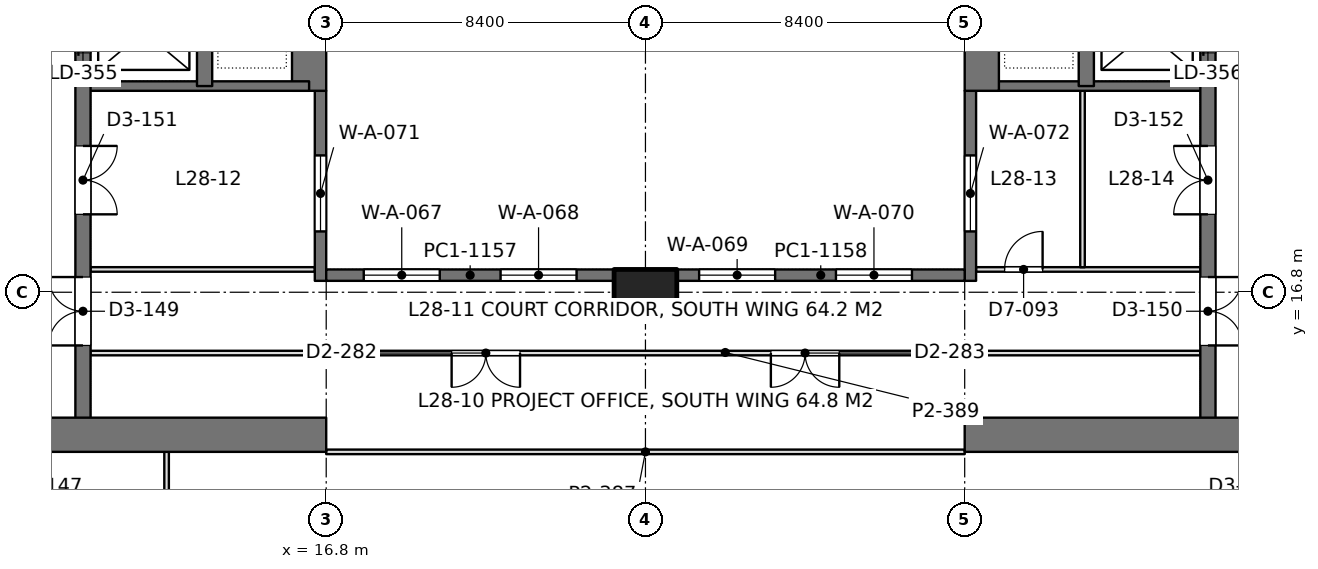
"""IFC4 building model, lengths in metres.
Left out: names, types, materials, properties, quantities, classifications, styles, units other than length and angle.
Written with IfcOpenShell. Run it as: python <this file> out.ifc"""

import sys

from ifc_helpers import new_model, si_unit, direction, frame, frame_2d, origin, origin_2d, place, context, subcontext, project, spatial, rectangle, extrude, element, fill, save


model = new_model("IFC4")
c1 = context("Model", 3, precision=1e-05, world=origin(), true_north=direction((0.0, 1.0)))
c2 = subcontext(c1, "Body", "Model", "MODEL_VIEW")
j1 = project(units=[si_unit("LENGTHUNIT", "METRE"), si_unit("PLANEANGLEUNIT", "RADIAN")], contexts=[c1])
p1 = place(None, origin())
s1 = spatial("IfcSite", under=j1, at=p1, CompositionType="ELEMENT")
p2 = place(p1, origin())
s2 = spatial("IfcBuilding", under=s1, at=p2, CompositionType="ELEMENT")
p3 = place(p2, frame((0.0, 0.0, 126.0)))
s3 = spatial("IfcBuildingStorey", under=s2, at=p3, CompositionType="ELEMENT", Elevation=126.0)
p4 = place(p3, frame((25.2, 16.8, 0.0), z_axis=(0.0, 0.0, 1.0), x_axis=(1.0, 0.0, 0.0)))
e1 = element("IfcColumn", 1, at=p4, inside=s3, PredefinedType="COLUMN", context=c2, shape_type="SweptSolid", body=[
    extrude(rectangle(XDim=1.65, YDim=1.2, at=origin_2d()), origin(), (0.0, 0.0, 1.0), 4.2),
])
p5 = place(p3, frame((-1.2, 13.05, 0.0), z_axis=(0.0, 0.0, 1.0), x_axis=(1.0, 0.0, 0.0)))
e2 = element("IfcWall", 2, at=p5, inside=s3, PredefinedType="SHEAR", context=c2, shape_type="SweptSolid", body=[
    extrude(rectangle(XDim=18.0, YDim=0.9, at=frame_2d((9.0, 0.0))), origin(), (0.0, 0.0, 1.0), 4.2),
])
p6 = place(p5, frame((8.95, 0.0, 0.0)))
e3 = element("IfcOpeningElement", 3, at=p6, cuts=e2, PredefinedType="OPENING", context=c2, shape_type="SweptSolid", body=[
    extrude(rectangle(XDim=1.8, YDim=2.4, at=frame_2d((0.9, 1.2))), frame((0.0, 0.46, 0.0), z_axis=(0.0, -1.0, 0.0), x_axis=(1.0, 0.0, 0.0)), (0.0, 0.0, 1.0), 0.92),
])
p7 = place(p3, frame((16.35, 22.1, 0.0), z_axis=(0.0, 0.0, 1.0), x_axis=(0.0, 1.0, 0.0)))
e4 = element("IfcWall", 4, at=p7, inside=s3, PredefinedType="SHEAR", context=c2, shape_type="SweptSolid", body=[
    extrude(rectangle(XDim=15.25, YDim=0.9, at=frame_2d((7.625, 0.0))), origin(), (0.0, 0.0, 1.0), 4.2),
])
p8 = place(p3, frame((10.4, 13.05, 0.0), z_axis=(0.0, 0.0, 1.0), x_axis=(0.0, 1.0, 0.0)))
e5 = element("IfcWall", 5, at=p8, inside=s3, PredefinedType="SHEAR", context=c2, shape_type="SweptSolid", body=[
    extrude(rectangle(XDim=24.3, YDim=0.4, at=frame_2d((12.15, 0.0))), origin(), (0.0, 0.0, 1.0), 4.2),
])
p9 = place(p8, frame((10.05, 0.0, 0.0)))
e6 = element("IfcOpeningElement", 6, at=p9, cuts=e5, PredefinedType="OPENING", context=c2, shape_type="SweptSolid", body=[
    extrude(rectangle(XDim=1.1, YDim=2.2, at=frame_2d((0.55, 1.1))), frame((0.0, 0.21, 0.0), z_axis=(0.0, -1.0, 0.0), x_axis=(1.0, 0.0, 0.0)), (0.0, 0.0, 1.0), 0.42),
])
p10 = place(p8, frame((12.9, 0.0, 0.0)))
e7 = element("IfcOpeningElement", 7, at=p10, cuts=e5, PredefinedType="OPENING", context=c2, shape_type="SweptSolid", body=[
    extrude(rectangle(XDim=1.1, YDim=2.2, at=frame_2d((0.55, 1.1))), frame((0.0, 0.21, 0.0), z_axis=(0.0, -1.0, 0.0), x_axis=(1.0, 0.0, 0.0)), (0.0, 0.0, 1.0), 0.42),
])
p11 = place(p8, frame((21.45, 0.0, 0.0)))
e8 = element("IfcOpeningElement", 8, at=p11, cuts=e5, PredefinedType="OPENING", context=c2, shape_type="SweptSolid", body=[
    extrude(rectangle(XDim=1.1, YDim=2.2, at=frame_2d((0.55, 1.1))), frame((0.0, 0.21, 0.0), z_axis=(0.0, -1.0, 0.0), x_axis=(1.0, 0.0, 0.0)), (0.0, 0.0, 1.0), 0.42),
])
p12 = place(p8, frame((2.35, 0.0, 0.0)))
e9 = element("IfcOpeningElement", 9, at=p12, cuts=e5, PredefinedType="OPENING", context=c2, shape_type="SweptSolid", body=[
    extrude(rectangle(XDim=1.8, YDim=2.4, at=frame_2d((0.9, 1.2))), frame((0.0, 0.21, 0.0), z_axis=(0.0, -1.0, 0.0), x_axis=(1.0, 0.0, 0.0)), (0.0, 0.0, 1.0), 0.42),
])
p13 = place(p8, frame((5.8, 0.0, 0.0)))
e10 = element("IfcOpeningElement", 10, at=p13, cuts=e5, PredefinedType="OPENING", context=c2, shape_type="SweptSolid", body=[
    extrude(rectangle(XDim=1.8, YDim=2.4, at=frame_2d((0.9, 1.2))), frame((0.0, 0.21, 0.0), z_axis=(0.0, -1.0, 0.0), x_axis=(1.0, 0.0, 0.0)), (0.0, 0.0, 1.0), 0.42),
])
p14 = place(p3, frame((13.6, 22.225, 0.0), z_axis=(0.0, 0.0, 1.0), x_axis=(0.0, 1.0, 0.0)))
e11 = element("IfcWall", 11, at=p14, inside=s3, PredefinedType="SHEAR", context=c2, shape_type="SweptSolid", body=[
    extrude(rectangle(XDim=15.125, YDim=0.4, at=frame_2d((7.562, 0.0))), origin(), (0.0, 0.0, 1.0), 4.2),
])
p15 = place(p3, frame((10.4, 22.225, 0.0), z_axis=(0.0, 0.0, 1.0), x_axis=(1.0, 0.0, 0.0)))
e12 = element("IfcWall", 12, at=p15, inside=s3, PredefinedType="SHEAR", context=c2, shape_type="SweptSolid", body=[
    extrude(rectangle(XDim=5.95, YDim=0.25, at=frame_2d((2.975, 0.0))), origin(), (0.0, 0.0, 1.0), 4.2),
])
p16 = place(p3, frame((33.6, 13.05, 0.0), z_axis=(0.0, 0.0, 1.0), x_axis=(1.0, 0.0, 0.0)))
e13 = element("IfcWall", 13, at=p16, inside=s3, PredefinedType="SHEAR", context=c2, shape_type="SweptSolid", body=[
    extrude(rectangle(XDim=18.0, YDim=0.9, at=frame_2d((9.0, 0.0))), origin(), (0.0, 0.0, 1.0), 4.2),
])
p17 = place(p16, frame((7.25, 0.0, 0.0)))
e14 = element("IfcOpeningElement", 14, at=p17, cuts=e13, PredefinedType="OPENING", context=c2, shape_type="SweptSolid", body=[
    extrude(rectangle(XDim=1.8, YDim=2.4, at=frame_2d((0.9, 1.2))), frame((0.0, 0.46, 0.0), z_axis=(0.0, -1.0, 0.0), x_axis=(1.0, 0.0, 0.0)), (0.0, 0.0, 1.0), 0.92),
])
p18 = place(p3, frame((34.05, 22.1, 0.0), z_axis=(0.0, 0.0, 1.0), x_axis=(0.0, 1.0, 0.0)))
e15 = element("IfcWall", 15, at=p18, inside=s3, PredefinedType="SHEAR", context=c2, shape_type="SweptSolid", body=[
    extrude(rectangle(XDim=15.25, YDim=0.9, at=frame_2d((7.625, 0.0))), origin(), (0.0, 0.0, 1.0), 4.2),
])
p19 = place(p3, frame((40.0, 13.05, 0.0), z_axis=(0.0, 0.0, 1.0), x_axis=(0.0, 1.0, 0.0)))
e16 = element("IfcWall", 16, at=p19, inside=s3, PredefinedType="SHEAR", context=c2, shape_type="SweptSolid", body=[
    extrude(rectangle(XDim=24.3, YDim=0.4, at=frame_2d((12.15, 0.0))), origin(), (0.0, 0.0, 1.0), 4.2),
])
p20 = place(p19, frame((10.05, 0.0, 0.0)))
e17 = element("IfcOpeningElement", 17, at=p20, cuts=e16, PredefinedType="OPENING", context=c2, shape_type="SweptSolid", body=[
    extrude(rectangle(XDim=1.1, YDim=2.2, at=frame_2d((0.55, 1.1))), frame((0.0, 0.21, 0.0), z_axis=(0.0, -1.0, 0.0), x_axis=(1.0, 0.0, 0.0)), (0.0, 0.0, 1.0), 0.42),
])
p21 = place(p19, frame((12.9, 0.0, 0.0)))
e18 = element("IfcOpeningElement", 18, at=p21, cuts=e16, PredefinedType="OPENING", context=c2, shape_type="SweptSolid", body=[
    extrude(rectangle(XDim=1.1, YDim=2.2, at=frame_2d((0.55, 1.1))), frame((0.0, 0.21, 0.0), z_axis=(0.0, -1.0, 0.0), x_axis=(1.0, 0.0, 0.0)), (0.0, 0.0, 1.0), 0.42),
])
p22 = place(p19, frame((21.45, 0.0, 0.0)))
e19 = element("IfcOpeningElement", 19, at=p22, cuts=e16, PredefinedType="OPENING", context=c2, shape_type="SweptSolid", body=[
    extrude(rectangle(XDim=1.1, YDim=2.2, at=frame_2d((0.55, 1.1))), frame((0.0, 0.21, 0.0), z_axis=(0.0, -1.0, 0.0), x_axis=(1.0, 0.0, 0.0)), (0.0, 0.0, 1.0), 0.42),
])
p23 = place(p19, frame((2.35, 0.0, 0.0)))
e20 = element("IfcOpeningElement", 20, at=p23, cuts=e16, PredefinedType="OPENING", context=c2, shape_type="SweptSolid", body=[
    extrude(rectangle(XDim=1.8, YDim=2.4, at=frame_2d((0.9, 1.2))), frame((0.0, 0.21, 0.0), z_axis=(0.0, -1.0, 0.0), x_axis=(1.0, 0.0, 0.0)), (0.0, 0.0, 1.0), 0.42),
])
p24 = place(p19, frame((5.8, 0.0, 0.0)))
e21 = element("IfcOpeningElement", 21, at=p24, cuts=e16, PredefinedType="OPENING", context=c2, shape_type="SweptSolid", body=[
    extrude(rectangle(XDim=1.8, YDim=2.4, at=frame_2d((0.9, 1.2))), frame((0.0, 0.21, 0.0), z_axis=(0.0, -1.0, 0.0), x_axis=(1.0, 0.0, 0.0)), (0.0, 0.0, 1.0), 0.42),
])
p25 = place(p3, frame((36.8, 22.225, 0.0), z_axis=(0.0, 0.0, 1.0), x_axis=(0.0, 1.0, 0.0)))
e22 = element("IfcWall", 22, at=p25, inside=s3, PredefinedType="SHEAR", context=c2, shape_type="SweptSolid", body=[
    extrude(rectangle(XDim=15.125, YDim=0.4, at=frame_2d((7.562, 0.0))), origin(), (0.0, 0.0, 1.0), 4.2),
])
p26 = place(p3, frame((40.0, 22.225, 0.0), z_axis=(0.0, 0.0, 1.0), x_axis=(-1.0, 0.0, 0.0)))
e23 = element("IfcWall", 23, at=p26, inside=s3, PredefinedType="SHEAR", context=c2, shape_type="SweptSolid", body=[
    extrude(rectangle(XDim=5.95, YDim=0.25, at=frame_2d((2.975, 0.0))), origin(), (0.0, 0.0, 1.0), 4.2),
])
p27 = place(p3, frame((16.65, 17.1, 0.0), z_axis=(0.0, 0.0, 1.0), x_axis=(0.0, 1.0, 0.0)))
e24 = element("IfcWall", 24, at=p27, inside=s3, PredefinedType="SOLIDWALL", context=c2, shape_type="SweptSolid", body=[
    extrude(rectangle(XDim=5.0, YDim=0.3, at=frame_2d((2.5, 0.0))), origin(), (0.0, 0.0, 1.0), 4.05),
])
p28 = place(p27, frame((1.3, 0.0, 0.1)))
e25 = element("IfcOpeningElement", 25, at=p28, cuts=e24, PredefinedType="OPENING", context=c2, shape_type="SweptSolid", body=[
    extrude(rectangle(XDim=2.0, YDim=3.0, at=frame_2d((1.0, 1.5))), frame((0.0, 0.16, 0.0), z_axis=(0.0, -1.0, 0.0), x_axis=(1.0, 0.0, 0.0)), (0.0, 0.0, 1.0), 0.32),
])
p29 = place(p3, frame((33.75, 17.1, 0.0), z_axis=(0.0, 0.0, 1.0), x_axis=(0.0, 1.0, 0.0)))
e26 = element("IfcWall", 26, at=p29, inside=s3, PredefinedType="SOLIDWALL", context=c2, shape_type="SweptSolid", body=[
    extrude(rectangle(XDim=5.0, YDim=0.3, at=frame_2d((2.5, 0.0))), origin(), (0.0, 0.0, 1.0), 4.05),
])
p30 = place(p29, frame((1.3, 0.0, 0.1)))
e27 = element("IfcOpeningElement", 27, at=p30, cuts=e26, PredefinedType="OPENING", context=c2, shape_type="SweptSolid", body=[
    extrude(rectangle(XDim=2.0, YDim=3.0, at=frame_2d((1.0, 1.5))), frame((0.0, 0.16, 0.0), z_axis=(0.0, -1.0, 0.0), x_axis=(1.0, 0.0, 0.0)), (0.0, 0.0, 1.0), 0.32),
])
p31 = place(p3, frame((16.8, 17.25, 0.0), z_axis=(0.0, 0.0, 1.0), x_axis=(1.0, 0.0, 0.0)))
e28 = element("IfcWall", 28, at=p31, inside=s3, PredefinedType="SOLIDWALL", context=c2, shape_type="SweptSolid", body=[
    extrude(rectangle(XDim=7.575, YDim=0.3, at=frame_2d((3.788, 0.0))), origin(), (0.0, 0.0, 1.0), 4.05),
])
p32 = place(p31, frame((0.988, 0.0, 0.1)))
e29 = element("IfcOpeningElement", 29, at=p32, cuts=e28, PredefinedType="OPENING", context=c2, shape_type="SweptSolid", body=[
    extrude(rectangle(XDim=2.0, YDim=3.0, at=frame_2d((1.0, 1.5))), frame((0.0, 0.16, 0.0), z_axis=(0.0, -1.0, 0.0), x_axis=(1.0, 0.0, 0.0)), (0.0, 0.0, 1.0), 0.32),
])
p33 = place(p31, frame((4.587, 0.0, 0.1)))
e30 = element("IfcOpeningElement", 30, at=p33, cuts=e28, PredefinedType="OPENING", context=c2, shape_type="SweptSolid", body=[
    extrude(rectangle(XDim=2.0, YDim=3.0, at=frame_2d((1.0, 1.5))), frame((0.0, 0.16, 0.0), z_axis=(0.0, -1.0, 0.0), x_axis=(1.0, 0.0, 0.0)), (0.0, 0.0, 1.0), 0.32),
])
p34 = place(p3, frame((26.025, 17.25, 0.0), z_axis=(0.0, 0.0, 1.0), x_axis=(1.0, 0.0, 0.0)))
e31 = element("IfcWall", 31, at=p34, inside=s3, PredefinedType="SOLIDWALL", context=c2, shape_type="SweptSolid", body=[
    extrude(rectangle(XDim=7.575, YDim=0.3, at=frame_2d((3.788, 0.0))), origin(), (0.0, 0.0, 1.0), 4.05),
])
p35 = place(p34, frame((0.587, 0.0, 0.1)))
e32 = element("IfcOpeningElement", 32, at=p35, cuts=e31, PredefinedType="OPENING", context=c2, shape_type="SweptSolid", body=[
    extrude(rectangle(XDim=2.0, YDim=3.0, at=frame_2d((1.0, 1.5))), frame((0.0, 0.16, 0.0), z_axis=(0.0, -1.0, 0.0), x_axis=(1.0, 0.0, 0.0)), (0.0, 0.0, 1.0), 0.32),
])
p36 = place(p34, frame((4.188, 0.0, 0.1)))
e33 = element("IfcOpeningElement", 33, at=p36, cuts=e31, PredefinedType="OPENING", context=c2, shape_type="SweptSolid", body=[
    extrude(rectangle(XDim=2.0, YDim=3.0, at=frame_2d((1.0, 1.5))), frame((0.0, 0.16, 0.0), z_axis=(0.0, -1.0, 0.0), x_axis=(1.0, 0.0, 0.0)), (0.0, 0.0, 1.0), 0.32),
])
p37 = place(p3, frame((10.598, 17.4, 0.0), z_axis=(0.0, 0.0, 1.0), x_axis=(1.0, 0.0, 0.0)))
e34 = element("IfcWall", 34, at=p37, inside=s3, PredefinedType="PARTITIONING", context=c2, shape_type="SweptSolid", body=[
    extrude(rectangle(XDim=5.904, YDim=0.12, at=frame_2d((2.952, 0.0))), origin(), (0.0, 0.0, 1.0), 3.55),
])
p38 = place(p3, frame((33.898, 17.4, 0.0), z_axis=(0.0, 0.0, 1.0), x_axis=(1.0, 0.0, 0.0)))
e35 = element("IfcWall", 35, at=p38, inside=s3, PredefinedType="PARTITIONING", context=c2, shape_type="SweptSolid", body=[
    extrude(rectangle(XDim=5.904, YDim=0.12, at=frame_2d((2.952, 0.0))), origin(), (0.0, 0.0, 1.0), 3.55),
])
p39 = place(p38, frame((0.752, 0.0, 0.0)))
e36 = element("IfcOpeningElement", 36, at=p39, cuts=e35, PredefinedType="OPENING", context=c2, shape_type="SweptSolid", body=[
    extrude(rectangle(XDim=1.0, YDim=2.4, at=frame_2d((0.5, 1.2))), frame((0.0, 0.07, 0.0), z_axis=(0.0, -1.0, 0.0), x_axis=(1.0, 0.0, 0.0)), (0.0, 0.0, 1.0), 0.14),
])
p40 = place(p3, frame((36.7, 17.458, 0.0), z_axis=(0.0, 0.0, 1.0), x_axis=(0.0, 1.0, 0.0)))
e37 = element("IfcWall", 37, at=p40, inside=s3, PredefinedType="PARTITIONING", context=c2, shape_type="SweptSolid", body=[
    extrude(rectangle(XDim=4.644, YDim=0.12, at=frame_2d((2.322, 0.0))), origin(), (0.0, 0.0, 1.0), 3.6),
])
p41 = place(p3, frame((12.6, 1.898, 0.0), z_axis=(0.0, 0.0, 1.0), x_axis=(0.0, 1.0, 0.0)))
e38 = element("IfcWall", 38, at=p41, inside=s3, PredefinedType="PARTITIONING", context=c2, shape_type="SweptSolid", body=[
    extrude(rectangle(XDim=10.704, YDim=0.12, at=frame_2d((5.352, 0.0))), origin(), (0.0, 0.0, 1.0), 3.55),
])
for number, where, z_axis, x_axis in (
    (39, (10.598, 15.2, 0.0), (0.0, 0.0, 1.0), (1.0, 0.0, 0.0)),
    (40, (33.598, 15.2, 0.0), (0.0, 0.0, 1.0), (1.0, 0.0, 0.0)),
):
    element("IfcWall", number, at=place(p3, frame(where, z_axis=z_axis, x_axis=x_axis)), inside=s3, PredefinedType="PARTITIONING", context=c2, shape_type="SweptSolid", body=[
        extrude(rectangle(XDim=6.204, YDim=0.12, at=frame_2d((3.102, 0.0))), origin(), (0.0, 0.0, 1.0), 3.55),
    ])
p42 = place(p3, frame((16.798, 15.2, 0.0), z_axis=(0.0, 0.0, 1.0), x_axis=(1.0, 0.0, 0.0)))
e41 = element("IfcWall", 41, at=p42, inside=s3, PredefinedType="PARTITIONING", context=c2, shape_type="SweptSolid", body=[
    extrude(rectangle(XDim=16.804, YDim=0.12, at=frame_2d((8.402, 0.0))), origin(), (0.0, 0.0, 1.0), 3.55),
])
p43 = place(p42, frame((3.302, 0.0, 0.0)))
e42 = element("IfcOpeningElement", 42, at=p43, cuts=e41, PredefinedType="OPENING", context=c2, shape_type="SweptSolid", body=[
    extrude(rectangle(XDim=1.8, YDim=2.2, at=frame_2d((0.9, 1.1))), frame((0.0, 0.07, 0.0), z_axis=(0.0, -1.0, 0.0), x_axis=(1.0, 0.0, 0.0)), (0.0, 0.0, 1.0), 0.14),
])
p44 = place(p42, frame((11.702, 0.0, 0.0)))
e43 = element("IfcOpeningElement", 43, at=p44, cuts=e41, PredefinedType="OPENING", context=c2, shape_type="SweptSolid", body=[
    extrude(rectangle(XDim=1.8, YDim=2.2, at=frame_2d((0.9, 1.1))), frame((0.0, 0.07, 0.0), z_axis=(0.0, -1.0, 0.0), x_axis=(1.0, 0.0, 0.0)), (0.0, 0.0, 1.0), 0.14),
])
p45 = place(p3, frame((16.8, 12.6, 0.0), z_axis=(0.0, 0.0, 1.0), x_axis=(1.0, 0.0, 0.0)))
e44 = element("IfcWall", 44, at=p45, inside=s3, PredefinedType="PARTITIONING", context=c2, shape_type="SweptSolid", body=[
    extrude(rectangle(XDim=16.8, YDim=0.12, at=frame_2d((8.4, 0.0))), origin(), (0.0, 0.0, 1.0), 3.55),
])
p46 = place(p28, origin())
e45 = element("IfcWindow", 45, at=p46, inside=s3, PartitioningType="SINGLE_PANEL", PredefinedType="WINDOW", context=c2, shape_type="SweptSolid", body=[
    extrude(rectangle(XDim=2.0, YDim=3.0, at=frame_2d((1.0, 1.5))), frame((0.0, 0.03, 0.0), z_axis=(0.0, -1.0, 0.0), x_axis=(1.0, 0.0, 0.0)), (0.0, 0.0, 1.0), 0.06),
])
fill(e25, e45)
p47 = place(p30, origin())
e46 = element("IfcWindow", 46, at=p47, inside=s3, PartitioningType="SINGLE_PANEL", PredefinedType="WINDOW", context=c2, shape_type="SweptSolid", body=[
    extrude(rectangle(XDim=2.0, YDim=3.0, at=frame_2d((1.0, 1.5))), frame((0.0, 0.03, 0.0), z_axis=(0.0, -1.0, 0.0), x_axis=(1.0, 0.0, 0.0)), (0.0, 0.0, 1.0), 0.06),
])
fill(e27, e46)
p48 = place(p32, origin())
e47 = element("IfcWindow", 47, at=p48, inside=s3, PartitioningType="SINGLE_PANEL", PredefinedType="WINDOW", context=c2, shape_type="SweptSolid", body=[
    extrude(rectangle(XDim=2.0, YDim=3.0, at=frame_2d((1.0, 1.5))), frame((0.0, 0.03, 0.0), z_axis=(0.0, -1.0, 0.0), x_axis=(1.0, 0.0, 0.0)), (0.0, 0.0, 1.0), 0.06),
])
fill(e29, e47)
p49 = place(p33, origin())
e48 = element("IfcWindow", 48, at=p49, inside=s3, PartitioningType="SINGLE_PANEL", PredefinedType="WINDOW", context=c2, shape_type="SweptSolid", body=[
    extrude(rectangle(XDim=2.0, YDim=3.0, at=frame_2d((1.0, 1.5))), frame((0.0, 0.03, 0.0), z_axis=(0.0, -1.0, 0.0), x_axis=(1.0, 0.0, 0.0)), (0.0, 0.0, 1.0), 0.06),
])
fill(e30, e48)
p50 = place(p35, origin())
e49 = element("IfcWindow", 49, at=p50, inside=s3, PartitioningType="SINGLE_PANEL", PredefinedType="WINDOW", context=c2, shape_type="SweptSolid", body=[
    extrude(rectangle(XDim=2.0, YDim=3.0, at=frame_2d((1.0, 1.5))), frame((0.0, 0.03, 0.0), z_axis=(0.0, -1.0, 0.0), x_axis=(1.0, 0.0, 0.0)), (0.0, 0.0, 1.0), 0.06),
])
fill(e32, e49)
p51 = place(p36, origin())
e50 = element("IfcWindow", 50, at=p51, inside=s3, PartitioningType="SINGLE_PANEL", PredefinedType="WINDOW", context=c2, shape_type="SweptSolid", body=[
    extrude(rectangle(XDim=2.0, YDim=3.0, at=frame_2d((1.0, 1.5))), frame((0.0, 0.03, 0.0), z_axis=(0.0, -1.0, 0.0), x_axis=(1.0, 0.0, 0.0)), (0.0, 0.0, 1.0), 0.06),
])
fill(e33, e50)
p52 = place(p12, origin())
e51 = element("IfcDoor", 51, at=p52, inside=s3, OperationType="DOUBLE_DOOR_SINGLE_SWING", PredefinedType="DOOR", context=c2, shape_type="SweptSolid", body=[
    extrude(rectangle(XDim=1.8, YDim=2.4, at=frame_2d((0.9, 1.2))), frame((0.0, 0.025, 0.0), z_axis=(0.0, -1.0, 0.0), x_axis=(1.0, 0.0, 0.0)), (0.0, 0.0, 1.0), 0.05),
])
fill(e9, e51)
p53 = place(p13, frame((1.8, 0.0, 0.0), z_axis=(0.0, 0.0, 1.0), x_axis=(-1.0, 0.0, 0.0)))
e52 = element("IfcDoor", 52, at=p53, inside=s3, OperationType="DOUBLE_DOOR_SINGLE_SWING", PredefinedType="DOOR", context=c2, shape_type="SweptSolid", body=[
    extrude(rectangle(XDim=1.8, YDim=2.4, at=frame_2d((0.9, 1.2))), frame((0.0, 0.025, 0.0), z_axis=(0.0, -1.0, 0.0), x_axis=(1.0, 0.0, 0.0)), (0.0, 0.0, 1.0), 0.05),
])
fill(e10, e52)
p54 = place(p23, frame((1.8, 0.0, 0.0), z_axis=(0.0, 0.0, 1.0), x_axis=(-1.0, 0.0, 0.0)))
e53 = element("IfcDoor", 53, at=p54, inside=s3, OperationType="DOUBLE_DOOR_SINGLE_SWING", PredefinedType="DOOR", context=c2, shape_type="SweptSolid", body=[
    extrude(rectangle(XDim=1.8, YDim=2.4, at=frame_2d((0.9, 1.2))), frame((0.0, 0.025, 0.0), z_axis=(0.0, -1.0, 0.0), x_axis=(1.0, 0.0, 0.0)), (0.0, 0.0, 1.0), 0.05),
])
fill(e20, e53)
p55 = place(p24, origin())
e54 = element("IfcDoor", 54, at=p55, inside=s3, OperationType="DOUBLE_DOOR_SINGLE_SWING", PredefinedType="DOOR", context=c2, shape_type="SweptSolid", body=[
    extrude(rectangle(XDim=1.8, YDim=2.4, at=frame_2d((0.9, 1.2))), frame((0.0, 0.025, 0.0), z_axis=(0.0, -1.0, 0.0), x_axis=(1.0, 0.0, 0.0)), (0.0, 0.0, 1.0), 0.05),
])
fill(e21, e54)
p56 = place(p39, origin())
e55 = element("IfcDoor", 55, at=p56, inside=s3, OperationType="SINGLE_SWING_RIGHT", PredefinedType="DOOR", context=c2, shape_type="SweptSolid", body=[
    extrude(rectangle(XDim=1.0, YDim=2.4, at=frame_2d((0.5, 1.2))), frame((0.0, 0.025, 0.0), z_axis=(0.0, -1.0, 0.0), x_axis=(1.0, 0.0, 0.0)), (0.0, 0.0, 1.0), 0.05),
])
fill(e36, e55)
p57 = place(p43, frame((1.8, 0.0, 0.0), z_axis=(0.0, 0.0, 1.0), x_axis=(-1.0, 0.0, 0.0)))
e56 = element("IfcDoor", 56, at=p57, inside=s3, OperationType="DOUBLE_DOOR_SINGLE_SWING", PredefinedType="DOOR", context=c2, shape_type="SweptSolid", body=[
    extrude(rectangle(XDim=1.8, YDim=2.2, at=frame_2d((0.9, 1.1))), frame((0.0, 0.025, 0.0), z_axis=(0.0, -1.0, 0.0), x_axis=(1.0, 0.0, 0.0)), (0.0, 0.0, 1.0), 0.05),
])
fill(e42, e56)
p58 = place(p44, frame((1.8, 0.0, 0.0), z_axis=(0.0, 0.0, 1.0), x_axis=(-1.0, 0.0, 0.0)))
e57 = element("IfcDoor", 57, at=p58, inside=s3, OperationType="DOUBLE_DOOR_SINGLE_SWING", PredefinedType="DOOR", context=c2, shape_type="SweptSolid", body=[
    extrude(rectangle(XDim=1.8, YDim=2.2, at=frame_2d((0.9, 1.1))), frame((0.0, 0.025, 0.0), z_axis=(0.0, -1.0, 0.0), x_axis=(1.0, 0.0, 0.0)), (0.0, 0.0, 1.0), 0.05),
])
fill(e43, e57)
save(model, sys.argv[1])
